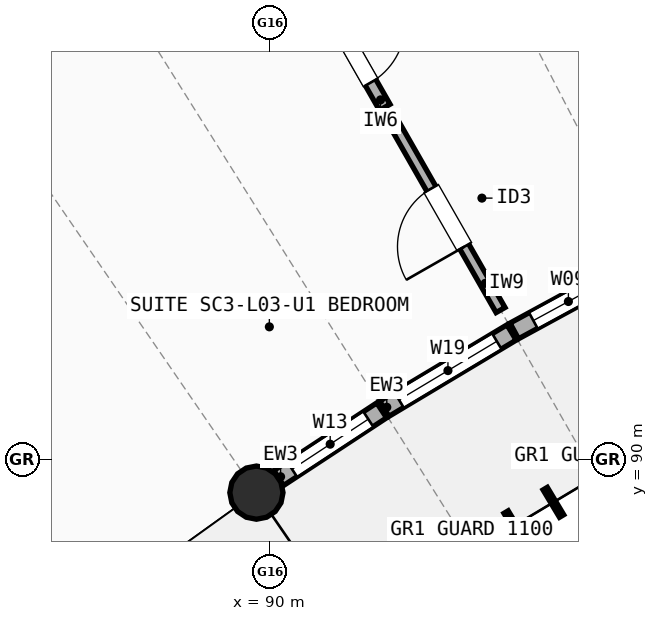
"""IFC4 building model, lengths in metres.
Left out: names, types, materials, properties, quantities, classifications, styles, units other than length and angle.
Written with IfcOpenShell. Run it as: python <this file> out.ifc"""

import sys

from ifc_helpers import new_model, si_unit, direction, frame, frame_2d, origin, origin_2d, place, context, subcontext, project, spatial, rectangle, circle, extrude, element, fill, save


model = new_model("IFC4")
c1 = context("Model", 3, precision=1e-05, world=origin(), true_north=direction((0.0, 1.0)))
c2 = subcontext(c1, "Body", "Model", "MODEL_VIEW")
j1 = project(units=[si_unit("LENGTHUNIT", "METRE"), si_unit("PLANEANGLEUNIT", "RADIAN")], contexts=[c1])
p1 = place(None, origin())
s1 = spatial("IfcSite", under=j1, at=p1, CompositionType="ELEMENT")
p2 = place(p1, origin())
s2 = spatial("IfcBuilding", under=s1, at=p2, CompositionType="ELEMENT")
p3 = place(p2, frame((0.0, 0.0, 10.9)))
s3 = spatial("IfcBuildingStorey", under=s2, at=p3, CompositionType="ELEMENT", Elevation=10.9)
p4 = place(p3, frame((89.822, 89.564, 0.0), z_axis=(0.0, 0.0, 1.0), x_axis=(1.0, 0.0, 0.0)))
e1 = element("IfcColumn", 1, at=p4, inside=s3, PredefinedType="COLUMN", context=c2, shape_type="SweptSolid", body=[
    extrude(circle(Radius=0.35, at=origin_2d()), origin(), (0.0, 0.0, 1.0), 2.948),
])
p5 = place(p3, frame((90.114, 89.757, 0.0), z_axis=(0.0, 0.0, 1.0), x_axis=(0.835873156341, 0.548922641644, 0.0)))
e2 = element("IfcWall", 2, at=p5, inside=s3, PredefinedType="STANDARD", context=c2, shape_type="SweptSolid", body=[
    extrude(rectangle(XDim=1.623, YDim=0.235, at=frame_2d((0.811, 0.0))), origin(), (0.0, 0.0, 1.0), 2.684),
])
p6 = place(p5, frame((0.211, 0.0, 0.85)))
e3 = element("IfcOpeningElement", 3, at=p6, cuts=e2, PredefinedType="OPENING", context=c2, shape_type="SweptSolid", body=[
    extrude(rectangle(XDim=1.2, YDim=1.45, at=frame_2d((0.6, 0.725))), frame((0.0, 0.127, 0.0), z_axis=(0.0, -1.0, 0.0), x_axis=(1.0, 0.0, 0.0)), (0.0, 0.0, 1.0), 0.255),
])
p7 = place(p3, frame((91.504, 90.668, 0.0), z_axis=(0.0, 0.0, 1.0), x_axis=(0.85787888411, 0.51385194385, 0.0)))
e4 = element("IfcWall", 4, at=p7, inside=s3, PredefinedType="STANDARD", context=c2, shape_type="SweptSolid", body=[
    extrude(rectangle(XDim=1.952, YDim=0.235, at=frame_2d((0.976, 0.0))), origin(), (0.0, 0.0, 1.0), 2.684),
])
p8 = place(p7, frame((0.226, 0.0, 0.85)))
e5 = element("IfcOpeningElement", 5, at=p8, cuts=e4, PredefinedType="OPENING", context=c2, shape_type="SweptSolid", body=[
    extrude(rectangle(XDim=1.5, YDim=1.5, at=frame_2d((0.75, 0.75))), frame((0.0, 0.127, 0.0), z_axis=(0.0, -1.0, 0.0), x_axis=(1.0, 0.0, 0.0)), (0.0, 0.0, 1.0), 0.255),
])
p9 = place(p3, frame((93.214, 91.692, 0.0), z_axis=(0.0, 0.0, 1.0), x_axis=(0.878452871629, 0.477828999044, 0.0)))
e6 = element("IfcWall", 6, at=p9, inside=s3, PredefinedType="STANDARD", context=c2, shape_type="SweptSolid", body=[
    extrude(rectangle(XDim=1.622, YDim=0.235, at=frame_2d((0.811, 0.0))), origin(), (0.0, 0.0, 1.0), 2.684),
])
p10 = place(p9, frame((0.286, 0.0, 0.85)))
e7 = element("IfcOpeningElement", 7, at=p10, cuts=e6, PredefinedType="OPENING", context=c2, shape_type="SweptSolid", body=[
    extrude(rectangle(XDim=1.05, YDim=1.35, at=frame_2d((0.525, 0.675))), frame((0.0, 0.127, 0.0), z_axis=(0.0, -1.0, 0.0), x_axis=(1.0, 0.0, 0.0)), (0.0, 0.0, 1.0), 0.255),
])
p11 = place(p3, frame((93.034, 91.967, 0.0), z_axis=(0.0, 0.0, 1.0), x_axis=(-0.495951127449, 0.868350435701, 0.0)))
e8 = element("IfcWall", 8, at=p11, inside=s3, PredefinedType="PARTITIONING", context=c2, shape_type="SweptSolid", body=[
    extrude(rectangle(XDim=2.8, YDim=0.135, at=frame_2d((1.4, 0.0))), origin(), (0.0, 0.0, 1.0), 2.742),
])
p12 = place(p11, frame((0.96, 0.0, 0.0)))
e9 = element("IfcOpeningElement", 9, at=p12, cuts=e8, PredefinedType="OPENING", context=c2, shape_type="SweptSolid", body=[
    extrude(rectangle(XDim=0.88, YDim=2.1, at=frame_2d((0.44, 1.05))), frame((0.0, 0.077, 0.0), z_axis=(0.0, -1.0, 0.0), x_axis=(1.0, 0.0, 0.0)), (0.0, 0.0, 1.0), 0.155),
])
p13 = place(p3, frame((91.51, 94.635, 0.0), z_axis=(0.0, 0.0, 1.0), x_axis=(-0.49583578404, 0.868416302971, 0.0)))
e10 = element("IfcWall", 10, at=p13, inside=s3, PredefinedType="PLUMBINGWALL", context=c2, shape_type="SweptSolid", body=[
    extrude(rectangle(XDim=1.648, YDim=0.16, at=frame_2d((0.824, 0.0))), origin(), (0.0, 0.0, 1.0), 2.742),
])
p14 = place(p13, frame((0.374, 0.0, 0.0)))
e11 = element("IfcOpeningElement", 11, at=p14, cuts=e10, PredefinedType="OPENING", context=c2, shape_type="SweptSolid", body=[
    extrude(rectangle(XDim=0.9, YDim=2.1, at=frame_2d((0.45, 1.05))), frame((0.0, 0.09, 0.0), z_axis=(0.0, -1.0, 0.0), x_axis=(1.0, 0.0, 0.0)), (0.0, 0.0, 1.0), 0.18),
])
p15 = place(p3, frame((96.556, 93.897, 0.0), z_axis=(0.0, 0.0, 1.0), x_axis=(-0.422206763189, 0.906499558256, 0.0)))
e12 = element("IfcWall", 12, at=p15, inside=s3, PredefinedType="SOLIDWALL", context=c2, shape_type="SweptSolid", body=[
    extrude(rectangle(XDim=6.736, YDim=0.23, at=frame_2d((3.368, 0.0))), origin(), (0.0, 0.0, 1.0), 2.722),
])
p16 = place(p6, origin())
e13 = element("IfcWindow", 13, at=p16, inside=s3, PartitioningType="SINGLE_PANEL", PredefinedType="WINDOW", context=c2, shape_type="SweptSolid", body=[
    extrude(rectangle(XDim=1.2, YDim=1.45, at=frame_2d((0.6, 0.725))), frame((0.0, 0.03, 0.0), z_axis=(0.0, -1.0, 0.0), x_axis=(1.0, 0.0, 0.0)), (0.0, 0.0, 1.0), 0.06),
])
fill(e3, e13)
p17 = place(p8, origin())
e14 = element("IfcWindow", 14, at=p17, inside=s3, PartitioningType="SINGLE_PANEL", PredefinedType="WINDOW", context=c2, shape_type="SweptSolid", body=[
    extrude(rectangle(XDim=1.5, YDim=1.5, at=frame_2d((0.75, 0.75))), frame((0.0, 0.03, 0.0), z_axis=(0.0, -1.0, 0.0), x_axis=(1.0, 0.0, 0.0)), (0.0, 0.0, 1.0), 0.06),
])
fill(e5, e14)
p18 = place(p10, origin())
e15 = element("IfcWindow", 15, at=p18, inside=s3, PartitioningType="SINGLE_PANEL", PredefinedType="WINDOW", context=c2, shape_type="SweptSolid", body=[
    extrude(rectangle(XDim=1.05, YDim=1.35, at=frame_2d((0.525, 0.675))), frame((0.0, 0.03, 0.0), z_axis=(0.0, -1.0, 0.0), x_axis=(1.0, 0.0, 0.0)), (0.0, 0.0, 1.0), 0.06),
])
fill(e7, e15)
p19 = place(p12, origin())
e16 = element("IfcDoor", 16, at=p19, inside=s3, OperationType="SINGLE_SWING_LEFT", PredefinedType="DOOR", context=c2, shape_type="SweptSolid", body=[
    extrude(rectangle(XDim=0.88, YDim=2.1, at=frame_2d((0.44, 1.05))), frame((0.0, 0.025, 0.0), z_axis=(0.0, -1.0, 0.0), x_axis=(1.0, 0.0, 0.0)), (0.0, 0.0, 1.0), 0.05),
])
fill(e9, e16)
p20 = place(p14, origin())
e17 = element("IfcDoor", 17, at=p20, inside=s3, OperationType="SINGLE_SWING_RIGHT", PredefinedType="DOOR", context=c2, shape_type="SweptSolid", body=[
    extrude(rectangle(XDim=0.9, YDim=2.1, at=frame_2d((0.45, 1.05))), frame((0.0, 0.025, 0.0), z_axis=(0.0, -1.0, 0.0), x_axis=(1.0, 0.0, 0.0)), (0.0, 0.0, 1.0), 0.05),
])
fill(e11, e17)
save(model, sys.argv[1])
